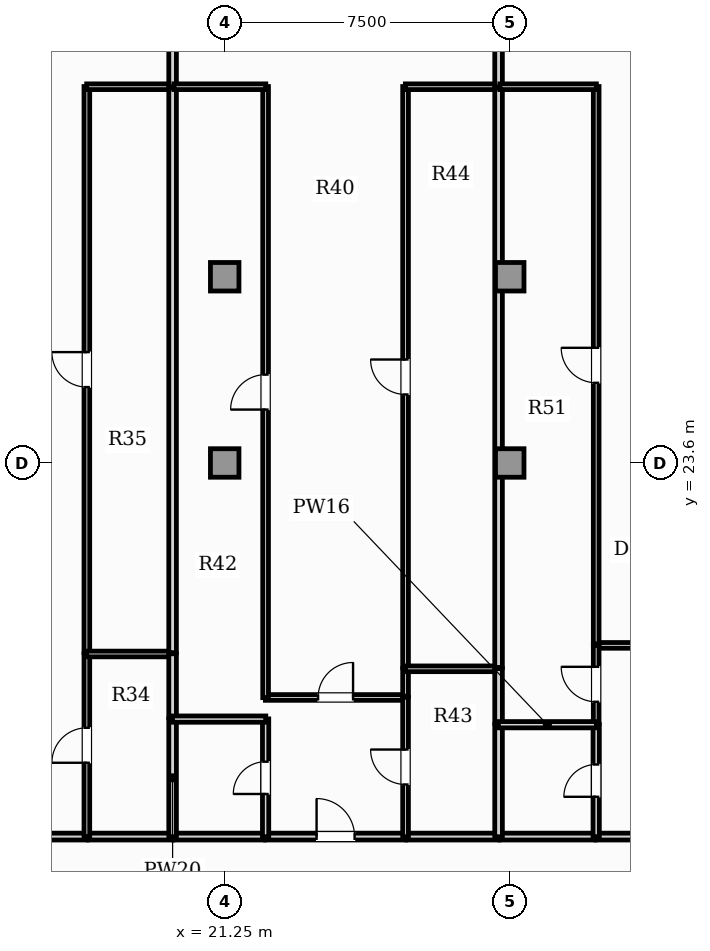
"""IFC4 building model, lengths in metres.
Left out: names, types, materials, properties, quantities, classifications, styles, units other than length and angle.
Written with IfcOpenShell. Run it as: python <this file> out.ifc"""

import sys

from ifc_helpers import new_model, si_unit, direction, frame, frame_2d, origin, origin_2d, place, context, subcontext, project, spatial, rectangle, extrude, element, fill, save


model = new_model("IFC4")
c1 = context("Model", 3, precision=1e-05, world=origin(), true_north=direction((0.0, 1.0)))
c2 = subcontext(c1, "Body", "Model", "MODEL_VIEW")
j1 = project(units=[si_unit("LENGTHUNIT", "METRE"), si_unit("PLANEANGLEUNIT", "RADIAN")], contexts=[c1])
p1 = place(None, origin())
s1 = spatial("IfcSite", under=j1, at=p1, CompositionType="ELEMENT")
p2 = place(p1, origin())
s2 = spatial("IfcBuilding", under=s1, at=p2, CompositionType="ELEMENT")
p3 = place(p2, frame((0.0, 0.0, 119.55)))
s3 = spatial("IfcBuildingStorey", under=s2, at=p3, CompositionType="ELEMENT", Elevation=119.55)
for number, where, z_axis, x_axis in (
    (1, (21.25, 23.6, 0.0), (0.0, 0.0, 1.0), (1.0, 0.0, 0.0)),
    (2, (28.75, 23.6, 0.0), (0.0, 0.0, 1.0), (1.0, 0.0, 0.0)),
    (3, (21.25, 28.5, 0.0), (0.0, 0.0, 1.0), (1.0, 0.0, 0.0)),
    (4, (28.75, 28.5, 0.0), (0.0, 0.0, 1.0), (1.0, 0.0, 0.0)),
):
    element("IfcColumn", number, at=place(p3, frame(where, z_axis=z_axis, x_axis=x_axis)), inside=s3, PredefinedType="COLUMN", context=c2, shape_type="SweptSolid", body=[
        extrude(rectangle(XDim=0.75, YDim=0.75, at=origin_2d()), origin(), (0.0, 0.0, 1.0), 3.85),
    ])
p4 = place(p3, frame((14.206, 13.77, 0.0), z_axis=(0.0, 0.0, 1.0), x_axis=(1.0, 0.0, 0.0)))
e5 = element("IfcWall", 5, at=p4, inside=s3, PredefinedType="PARTITIONING", context=c2, shape_type="SweptSolid", body=[
    extrude(rectangle(XDim=3.422, YDim=0.18, at=frame_2d((1.711, 0.0))), origin(), (0.0, 0.0, 1.0), 3.6),
])
p5 = place(p4, frame((1.211, 0.0, 0.0)))
e6 = element("IfcOpeningElement", 6, at=p5, cuts=e5, PredefinedType="OPENING", context=c2, shape_type="SweptSolid", body=[
    extrude(rectangle(XDim=1.0, YDim=2.15, at=frame_2d((0.5, 1.075))), frame((0.0, 0.1, 0.0), z_axis=(0.0, -1.0, 0.0), x_axis=(1.0, 0.0, 0.0)), (0.0, 0.0, 1.0), 0.2),
])
p6 = place(p3, frame((17.658, 13.77, 0.0), z_axis=(0.0, 0.0, 1.0), x_axis=(1.0, 0.0, 0.0)))
e7 = element("IfcWall", 7, at=p6, inside=s3, PredefinedType="PARTITIONING", context=c2, shape_type="SweptSolid", body=[
    extrude(rectangle(XDim=2.226, YDim=0.18, at=frame_2d((1.113, 0.0))), origin(), (0.0, 0.0, 1.0), 3.6),
])
p7 = place(p3, frame((22.321, 13.77, 0.0), z_axis=(0.0, 0.0, 1.0), x_axis=(1.0, 0.0, 0.0)))
e8 = element("IfcWall", 8, at=p7, inside=s3, PredefinedType="PARTITIONING", context=c2, shape_type="SweptSolid", body=[
    extrude(rectangle(XDim=3.693, YDim=0.18, at=frame_2d((1.846, 0.0))), origin(), (0.0, 0.0, 1.0), 3.6),
])
p8 = place(p7, frame((1.346, 0.0, 0.0)))
e9 = element("IfcOpeningElement", 9, at=p8, cuts=e8, PredefinedType="OPENING", context=c2, shape_type="SweptSolid", body=[
    extrude(rectangle(XDim=1.0, YDim=2.15, at=frame_2d((0.5, 1.075))), frame((0.0, 0.1, 0.0), z_axis=(0.0, -1.0, 0.0), x_axis=(1.0, 0.0, 0.0)), (0.0, 0.0, 1.0), 0.2),
])
p9 = place(p3, frame((19.914, 13.77, 0.0), z_axis=(0.0, 0.0, 1.0), x_axis=(1.0, 0.0, 0.0)))
e10 = element("IfcWall", 10, at=p9, inside=s3, PredefinedType="PARTITIONING", context=c2, shape_type="SweptSolid", body=[
    extrude(rectangle(XDim=2.377, YDim=0.18, at=frame_2d((1.188, 0.0))), origin(), (0.0, 0.0, 1.0), 3.6),
])
p10 = place(p3, frame((26.044, 13.77, 0.0), z_axis=(0.0, 0.0, 1.0), x_axis=(1.0, 0.0, 0.0)))
e11 = element("IfcWall", 11, at=p10, inside=s3, PredefinedType="PARTITIONING", context=c2, shape_type="SweptSolid", body=[
    extrude(rectangle(XDim=2.417, YDim=0.18, at=frame_2d((1.208, 0.0))), origin(), (0.0, 0.0, 1.0), 3.6),
])
p11 = place(p3, frame((31.02, 13.77, 0.0), z_axis=(0.0, 0.0, 1.0), x_axis=(1.0, 0.0, 0.0)))
e12 = element("IfcWall", 12, at=p11, inside=s3, PredefinedType="PARTITIONING", context=c2, shape_type="SweptSolid", body=[
    extrude(rectangle(XDim=3.963, YDim=0.18, at=frame_2d((1.981, 0.0))), origin(), (0.0, 0.0, 1.0), 3.6),
])
p12 = place(p11, frame((1.481, 0.0, 0.0)))
e13 = element("IfcOpeningElement", 13, at=p12, cuts=e12, PredefinedType="OPENING", context=c2, shape_type="SweptSolid", body=[
    extrude(rectangle(XDim=1.0, YDim=2.15, at=frame_2d((0.5, 1.075))), frame((0.0, 0.1, 0.0), z_axis=(0.0, -1.0, 0.0), x_axis=(1.0, 0.0, 0.0)), (0.0, 0.0, 1.0), 0.2),
])
p13 = place(p3, frame((28.491, 13.77, 0.0), z_axis=(0.0, 0.0, 1.0), x_axis=(1.0, 0.0, 0.0)))
e14 = element("IfcWall", 14, at=p13, inside=s3, PredefinedType="PARTITIONING", context=c2, shape_type="SweptSolid", body=[
    extrude(rectangle(XDim=2.498, YDim=0.18, at=frame_2d((1.249, 0.0))), origin(), (0.0, 0.0, 1.0), 3.6),
])
p14 = place(p3, frame((17.623, 13.765, 0.0), z_axis=(0.0, 0.0, 1.0), x_axis=(0.0, 1.0, 0.0)))
e15 = element("IfcWall", 15, at=p14, inside=s3, PredefinedType="PARTITIONING", context=c2, shape_type="SweptSolid", body=[
    extrude(rectangle(XDim=4.814, YDim=0.15, at=frame_2d((2.407, 0.0))), origin(), (0.0, 0.0, 1.0), 3.6),
])
p15 = place(p14, frame((1.947, 0.0, 0.0)))
e16 = element("IfcOpeningElement", 16, at=p15, cuts=e15, PredefinedType="OPENING", context=c2, shape_type="SweptSolid", body=[
    extrude(rectangle(XDim=0.92, YDim=2.1, at=frame_2d((0.46, 1.05))), frame((0.0, 0.085, 0.0), z_axis=(0.0, -1.0, 0.0), x_axis=(1.0, 0.0, 0.0)), (0.0, 0.0, 1.0), 0.17),
])
p16 = place(p3, frame((17.623, 18.609, 0.0), z_axis=(0.0, 0.0, 1.0), x_axis=(0.0, 1.0, 0.0)))
e17 = element("IfcWall", 17, at=p16, inside=s3, PredefinedType="PARTITIONING", context=c2, shape_type="SweptSolid", body=[
    extrude(rectangle(XDim=14.896, YDim=0.15, at=frame_2d((7.448, 0.0))), origin(), (0.0, 0.0, 1.0), 3.6),
])
p17 = place(p16, frame((6.988, 0.0, 0.0)))
e18 = element("IfcOpeningElement", 18, at=p17, cuts=e17, PredefinedType="OPENING", context=c2, shape_type="SweptSolid", body=[
    extrude(rectangle(XDim=0.92, YDim=2.1, at=frame_2d((0.46, 1.05))), frame((0.0, 0.085, 0.0), z_axis=(0.0, -1.0, 0.0), x_axis=(1.0, 0.0, 0.0)), (0.0, 0.0, 1.0), 0.17),
])
p18 = place(p3, frame((17.618, 33.5, 0.0), z_axis=(0.0, 0.0, 1.0), x_axis=(1.0, 0.0, 0.0)))
e19 = element("IfcWall", 19, at=p18, inside=s3, PredefinedType="PARTITIONING", context=c2, shape_type="SweptSolid", body=[
    extrude(rectangle(XDim=2.266, YDim=0.15, at=frame_2d((1.133, 0.0))), origin(), (0.0, 0.0, 1.0), 3.6),
])
p19 = place(p3, frame((19.879, 33.495, 0.0), z_axis=(0.0, 0.0, 1.0), x_axis=(0.0, 1.0, 0.0)))
e20 = element("IfcWall", 20, at=p19, inside=s3, PredefinedType="PARTITIONING", context=c2, shape_type="SweptSolid", body=[
    extrude(rectangle(XDim=1.51, YDim=0.2, at=frame_2d((0.755, 0.0))), origin(), (0.0, 0.0, 1.0), 3.6),
])
p20 = place(p3, frame((17.618, 18.574, 0.0), z_axis=(0.0, 0.0, 1.0), x_axis=(1.0, 0.0, 0.0)))
e21 = element("IfcWall", 21, at=p20, inside=s3, PredefinedType="PARTITIONING", context=c2, shape_type="SweptSolid", body=[
    extrude(rectangle(XDim=2.266, YDim=0.15, at=frame_2d((1.133, 0.0))), origin(), (0.0, 0.0, 1.0), 3.6),
])
p21 = place(p3, frame((19.879, 13.765, 0.0), z_axis=(0.0, 0.0, 1.0), x_axis=(0.0, 1.0, 0.0)))
e22 = element("IfcWall", 22, at=p21, inside=s3, PredefinedType="PARTITIONING", context=c2, shape_type="SweptSolid", body=[
    extrude(rectangle(XDim=3.101, YDim=0.2, at=frame_2d((1.551, 0.0))), origin(), (0.0, 0.0, 1.0), 3.6),
])
p22 = place(p3, frame((19.879, 16.896, 0.0), z_axis=(0.0, 0.0, 1.0), x_axis=(0.0, 1.0, 0.0)))
e23 = element("IfcWall", 23, at=p22, inside=s3, PredefinedType="PARTITIONING", context=c2, shape_type="SweptSolid", body=[
    extrude(rectangle(XDim=1.683, YDim=0.2, at=frame_2d((0.842, 0.0))), origin(), (0.0, 0.0, 1.0), 3.6),
])
p23 = place(p3, frame((19.879, 18.609, 0.0), z_axis=(0.0, 0.0, 1.0), x_axis=(0.0, 1.0, 0.0)))
e24 = element("IfcWall", 24, at=p23, inside=s3, PredefinedType="PARTITIONING", context=c2, shape_type="SweptSolid", body=[
    extrude(rectangle(XDim=14.856, YDim=0.2, at=frame_2d((7.428, 0.0))), origin(), (0.0, 0.0, 1.0), 3.6),
])
p24 = place(p3, frame((22.321, 17.43, 0.0), z_axis=(0.0, 0.0, 1.0), x_axis=(1.0, 0.0, 0.0)))
e25 = element("IfcWall", 25, at=p24, inside=s3, PredefinedType="PARTITIONING", context=c2, shape_type="SweptSolid", body=[
    extrude(rectangle(XDim=3.693, YDim=0.15, at=frame_2d((1.846, 0.0))), origin(), (0.0, 0.0, 1.0), 3.6),
])
p25 = place(p24, frame((1.386, 0.0, 0.0)))
e26 = element("IfcOpeningElement", 26, at=p25, cuts=e25, PredefinedType="OPENING", context=c2, shape_type="SweptSolid", body=[
    extrude(rectangle(XDim=0.92, YDim=2.1, at=frame_2d((0.46, 1.05))), frame((0.0, 0.085, 0.0), z_axis=(0.0, -1.0, 0.0), x_axis=(1.0, 0.0, 0.0)), (0.0, 0.0, 1.0), 0.17),
])
p26 = place(p3, frame((22.326, 13.765, 0.0), z_axis=(0.0, 0.0, 1.0), x_axis=(0.0, 1.0, 0.0)))
e27 = element("IfcWall", 27, at=p26, inside=s3, PredefinedType="PLUMBINGWALL", context=c2, shape_type="SweptSolid", body=[
    extrude(rectangle(XDim=3.101, YDim=0.165, at=frame_2d((1.551, 0.0))), origin(), (0.0, 0.0, 1.0), 3.6),
])
p27 = place(p26, frame((1.125, 0.0, 0.0)))
e28 = element("IfcOpeningElement", 28, at=p27, cuts=e27, PredefinedType="OPENING", context=c2, shape_type="SweptSolid", body=[
    extrude(rectangle(XDim=0.85, YDim=2.1, at=frame_2d((0.425, 1.05))), frame((0.0, 0.093, 0.0), z_axis=(0.0, -1.0, 0.0), x_axis=(1.0, 0.0, 0.0)), (0.0, 0.0, 1.0), 0.185),
])
p28 = place(p3, frame((26.009, 13.765, 0.0), z_axis=(0.0, 0.0, 1.0), x_axis=(0.0, 1.0, 0.0)))
e29 = element("IfcWall", 29, at=p28, inside=s3, PredefinedType="PARTITIONING", context=c2, shape_type="SweptSolid", body=[
    extrude(rectangle(XDim=3.67, YDim=0.15, at=frame_2d((1.835, 0.0))), origin(), (0.0, 0.0, 1.0), 3.6),
])
p29 = place(p28, frame((1.375, 0.0, 0.0)))
e30 = element("IfcOpeningElement", 30, at=p29, cuts=e29, PredefinedType="OPENING", context=c2, shape_type="SweptSolid", body=[
    extrude(rectangle(XDim=0.92, YDim=2.1, at=frame_2d((0.46, 1.05))), frame((0.0, 0.085, 0.0), z_axis=(0.0, -1.0, 0.0), x_axis=(1.0, 0.0, 0.0)), (0.0, 0.0, 1.0), 0.17),
])
p30 = place(p3, frame((22.326, 17.425, 0.0), z_axis=(0.0, 0.0, 1.0), x_axis=(0.0, 1.0, 0.0)))
e31 = element("IfcWall", 31, at=p30, inside=s3, PredefinedType="PARTITIONING", context=c2, shape_type="SweptSolid", body=[
    extrude(rectangle(XDim=16.08, YDim=0.15, at=frame_2d((8.04, 0.0))), origin(), (0.0, 0.0, 1.0), 3.6),
])
p31 = place(p30, frame((7.58, 0.0, 0.0)))
e32 = element("IfcOpeningElement", 32, at=p31, cuts=e31, PredefinedType="OPENING", context=c2, shape_type="SweptSolid", body=[
    extrude(rectangle(XDim=0.92, YDim=2.1, at=frame_2d((0.46, 1.05))), frame((0.0, 0.085, 0.0), z_axis=(0.0, -1.0, 0.0), x_axis=(1.0, 0.0, 0.0)), (0.0, 0.0, 1.0), 0.17),
])
p32 = place(p3, frame((19.914, 33.5, 0.0), z_axis=(0.0, 0.0, 1.0), x_axis=(1.0, 0.0, 0.0)))
e33 = element("IfcWall", 33, at=p32, inside=s3, PredefinedType="PARTITIONING", context=c2, shape_type="SweptSolid", body=[
    extrude(rectangle(XDim=2.417, YDim=0.15, at=frame_2d((1.208, 0.0))), origin(), (0.0, 0.0, 1.0), 3.6),
])
p33 = place(p3, frame((26.009, 17.465, 0.0), z_axis=(0.0, 0.0, 1.0), x_axis=(0.0, 1.0, 0.0)))
e34 = element("IfcWall", 34, at=p33, inside=s3, PredefinedType="PARTITIONING", context=c2, shape_type="SweptSolid", body=[
    extrude(rectangle(XDim=0.724, YDim=0.15, at=frame_2d((0.362, 0.0))), origin(), (0.0, 0.0, 1.0), 3.6),
])
p34 = place(p3, frame((26.009, 18.219, 0.0), z_axis=(0.0, 0.0, 1.0), x_axis=(0.0, 1.0, 0.0)))
e35 = element("IfcWall", 35, at=p34, inside=s3, PredefinedType="PARTITIONING", context=c2, shape_type="SweptSolid", body=[
    extrude(rectangle(XDim=15.285, YDim=0.15, at=frame_2d((7.643, 0.0))), origin(), (0.0, 0.0, 1.0), 3.6),
])
p35 = place(p34, frame((7.183, 0.0, 0.0)))
e36 = element("IfcOpeningElement", 36, at=p35, cuts=e35, PredefinedType="OPENING", context=c2, shape_type="SweptSolid", body=[
    extrude(rectangle(XDim=0.92, YDim=2.1, at=frame_2d((0.46, 1.05))), frame((0.0, 0.085, 0.0), z_axis=(0.0, -1.0, 0.0), x_axis=(1.0, 0.0, 0.0)), (0.0, 0.0, 1.0), 0.17),
])
p36 = place(p3, frame((26.004, 33.5, 0.0), z_axis=(0.0, 0.0, 1.0), x_axis=(1.0, 0.0, 0.0)))
e37 = element("IfcWall", 37, at=p36, inside=s3, PredefinedType="PARTITIONING", context=c2, shape_type="SweptSolid", body=[
    extrude(rectangle(XDim=2.457, YDim=0.15, at=frame_2d((1.229, 0.0))), origin(), (0.0, 0.0, 1.0), 3.6),
])
p37 = place(p3, frame((28.456, 33.495, 0.0), z_axis=(0.0, 0.0, 1.0), x_axis=(0.0, 1.0, 0.0)))
e38 = element("IfcWall", 38, at=p37, inside=s3, PredefinedType="PARTITIONING", context=c2, shape_type="SweptSolid", body=[
    extrude(rectangle(XDim=1.51, YDim=0.2, at=frame_2d((0.755, 0.0))), origin(), (0.0, 0.0, 1.0), 3.6),
])
p38 = place(p3, frame((19.874, 16.861, 0.0), z_axis=(0.0, 0.0, 1.0), x_axis=(1.0, 0.0, 0.0)))
e39 = element("IfcWall", 39, at=p38, inside=s3, PredefinedType="PLUMBINGWALL", context=c2, shape_type="SweptSolid", body=[
    extrude(rectangle(XDim=2.457, YDim=0.165, at=frame_2d((1.229, 0.0))), origin(), (0.0, 0.0, 1.0), 3.6),
])
p39 = place(p3, frame((26.004, 18.185, 0.0), z_axis=(0.0, 0.0, 1.0), x_axis=(1.0, 0.0, 0.0)))
e40 = element("IfcWall", 40, at=p39, inside=s3, PredefinedType="PARTITIONING", context=c2, shape_type="SweptSolid", body=[
    extrude(rectangle(XDim=2.457, YDim=0.15, at=frame_2d((1.229, 0.0))), origin(), (0.0, 0.0, 1.0), 3.6),
])
p40 = place(p3, frame((28.456, 13.765, 0.0), z_axis=(0.0, 0.0, 1.0), x_axis=(0.0, 1.0, 0.0)))
e41 = element("IfcWall", 41, at=p40, inside=s3, PredefinedType="PARTITIONING", context=c2, shape_type="SweptSolid", body=[
    extrude(rectangle(XDim=2.953, YDim=0.2, at=frame_2d((1.477, 0.0))), origin(), (0.0, 0.0, 1.0), 3.6),
])
p41 = place(p3, frame((28.456, 16.748, 0.0), z_axis=(0.0, 0.0, 1.0), x_axis=(0.0, 1.0, 0.0)))
e42 = element("IfcWall", 42, at=p41, inside=s3, PredefinedType="PARTITIONING", context=c2, shape_type="SweptSolid", body=[
    extrude(rectangle(XDim=1.441, YDim=0.2, at=frame_2d((0.721, 0.0))), origin(), (0.0, 0.0, 1.0), 3.6),
])
p42 = place(p3, frame((28.456, 18.219, 0.0), z_axis=(0.0, 0.0, 1.0), x_axis=(0.0, 1.0, 0.0)))
e43 = element("IfcWall", 43, at=p42, inside=s3, PredefinedType="PARTITIONING", context=c2, shape_type="SweptSolid", body=[
    extrude(rectangle(XDim=15.246, YDim=0.2, at=frame_2d((7.623, 0.0))), origin(), (0.0, 0.0, 1.0), 3.6),
])
p43 = place(p3, frame((31.02, 18.801, 0.0), z_axis=(0.0, 0.0, 1.0), x_axis=(1.0, 0.0, 0.0)))
e44 = element("IfcWall", 44, at=p43, inside=s3, PredefinedType="PARTITIONING", context=c2, shape_type="SweptSolid", body=[
    extrude(rectangle(XDim=3.963, YDim=0.15, at=frame_2d((1.981, 0.0))), origin(), (0.0, 0.0, 1.0), 3.6),
])
p44 = place(p43, frame((1.521, 0.0, 0.0)))
e45 = element("IfcOpeningElement", 45, at=p44, cuts=e44, PredefinedType="OPENING", context=c2, shape_type="SweptSolid", body=[
    extrude(rectangle(XDim=0.92, YDim=2.1, at=frame_2d((0.46, 1.05))), frame((0.0, 0.085, 0.0), z_axis=(0.0, -1.0, 0.0), x_axis=(1.0, 0.0, 0.0)), (0.0, 0.0, 1.0), 0.17),
])
p45 = place(p3, frame((31.025, 13.765, 0.0), z_axis=(0.0, 0.0, 1.0), x_axis=(0.0, 1.0, 0.0)))
e46 = element("IfcWall", 46, at=p45, inside=s3, PredefinedType="PLUMBINGWALL", context=c2, shape_type="SweptSolid", body=[
    extrude(rectangle(XDim=2.953, YDim=0.165, at=frame_2d((1.477, 0.0))), origin(), (0.0, 0.0, 1.0), 3.6),
])
p46 = place(p45, frame((1.052, 0.0, 0.0)))
e47 = element("IfcOpeningElement", 47, at=p46, cuts=e46, PredefinedType="OPENING", context=c2, shape_type="SweptSolid", body=[
    extrude(rectangle(XDim=0.85, YDim=2.1, at=frame_2d((0.425, 1.05))), frame((0.0, 0.093, 0.0), z_axis=(0.0, -1.0, 0.0), x_axis=(1.0, 0.0, 0.0)), (0.0, 0.0, 1.0), 0.185),
])
p47 = place(p3, frame((31.025, 16.748, 0.0), z_axis=(0.0, 0.0, 1.0), x_axis=(0.0, 1.0, 0.0)))
e48 = element("IfcWall", 48, at=p47, inside=s3, PredefinedType="PARTITIONING", context=c2, shape_type="SweptSolid", body=[
    extrude(rectangle(XDim=2.057, YDim=0.15, at=frame_2d((1.029, 0.0))), origin(), (0.0, 0.0, 1.0), 3.6),
])
p48 = place(p47, frame((0.569, 0.0, 0.0)))
e49 = element("IfcOpeningElement", 49, at=p48, cuts=e48, PredefinedType="OPENING", context=c2, shape_type="SweptSolid", body=[
    extrude(rectangle(XDim=0.92, YDim=2.1, at=frame_2d((0.46, 1.05))), frame((0.0, 0.085, 0.0), z_axis=(0.0, -1.0, 0.0), x_axis=(1.0, 0.0, 0.0)), (0.0, 0.0, 1.0), 0.17),
])
p49 = place(p3, frame((31.025, 18.835, 0.0), z_axis=(0.0, 0.0, 1.0), x_axis=(0.0, 1.0, 0.0)))
e50 = element("IfcWall", 50, at=p49, inside=s3, PredefinedType="PARTITIONING", context=c2, shape_type="SweptSolid", body=[
    extrude(rectangle(XDim=14.669, YDim=0.15, at=frame_2d((7.335, 0.0))), origin(), (0.0, 0.0, 1.0), 3.6),
])
p50 = place(p49, frame((6.875, 0.0, 0.0)))
e51 = element("IfcOpeningElement", 51, at=p50, cuts=e50, PredefinedType="OPENING", context=c2, shape_type="SweptSolid", body=[
    extrude(rectangle(XDim=0.92, YDim=2.1, at=frame_2d((0.46, 1.05))), frame((0.0, 0.085, 0.0), z_axis=(0.0, -1.0, 0.0), x_axis=(1.0, 0.0, 0.0)), (0.0, 0.0, 1.0), 0.17),
])
p51 = place(p3, frame((28.491, 33.5, 0.0), z_axis=(0.0, 0.0, 1.0), x_axis=(1.0, 0.0, 0.0)))
e52 = element("IfcWall", 52, at=p51, inside=s3, PredefinedType="PARTITIONING", context=c2, shape_type="SweptSolid", body=[
    extrude(rectangle(XDim=2.538, YDim=0.15, at=frame_2d((1.269, 0.0))), origin(), (0.0, 0.0, 1.0), 3.6),
])
p52 = place(p3, frame((28.451, 16.713, 0.0), z_axis=(0.0, 0.0, 1.0), x_axis=(1.0, 0.0, 0.0)))
e53 = element("IfcWall", 53, at=p52, inside=s3, PredefinedType="PLUMBINGWALL", context=c2, shape_type="SweptSolid", body=[
    extrude(rectangle(XDim=2.578, YDim=0.165, at=frame_2d((1.289, 0.0))), origin(), (0.0, 0.0, 1.0), 3.6),
])
p53 = place(p8, origin())
e54 = element("IfcDoor", 54, at=p53, inside=s3, OperationType="SINGLE_SWING_LEFT", PredefinedType="DOOR", context=c2, shape_type="SweptSolid", body=[
    extrude(rectangle(XDim=1.0, YDim=2.15, at=frame_2d((0.5, 1.075))), frame((0.0, 0.025, 0.0), z_axis=(0.0, -1.0, 0.0), x_axis=(1.0, 0.0, 0.0)), (0.0, 0.0, 1.0), 0.05),
])
fill(e9, e54)
p54 = place(p15, origin())
e55 = element("IfcDoor", 55, at=p54, inside=s3, OperationType="SINGLE_SWING_LEFT", PredefinedType="DOOR", context=c2, shape_type="SweptSolid", body=[
    extrude(rectangle(XDim=0.92, YDim=2.1, at=frame_2d((0.46, 1.05))), frame((0.0, 0.025, 0.0), z_axis=(0.0, -1.0, 0.0), x_axis=(1.0, 0.0, 0.0)), (0.0, 0.0, 1.0), 0.05),
])
fill(e16, e55)
p55 = place(p17, origin())
e56 = element("IfcDoor", 56, at=p55, inside=s3, OperationType="SINGLE_SWING_RIGHT", PredefinedType="DOOR", context=c2, shape_type="SweptSolid", body=[
    extrude(rectangle(XDim=0.92, YDim=2.1, at=frame_2d((0.46, 1.05))), frame((0.0, 0.025, 0.0), z_axis=(0.0, -1.0, 0.0), x_axis=(1.0, 0.0, 0.0)), (0.0, 0.0, 1.0), 0.05),
])
fill(e18, e56)
p56 = place(p25, origin())
e57 = element("IfcDoor", 57, at=p56, inside=s3, OperationType="SINGLE_SWING_RIGHT", PredefinedType="DOOR", context=c2, shape_type="SweptSolid", body=[
    extrude(rectangle(XDim=0.92, YDim=2.1, at=frame_2d((0.46, 1.05))), frame((0.0, 0.025, 0.0), z_axis=(0.0, -1.0, 0.0), x_axis=(1.0, 0.0, 0.0)), (0.0, 0.0, 1.0), 0.05),
])
fill(e26, e57)
p57 = place(p27, origin())
e58 = element("IfcDoor", 58, at=p57, inside=s3, OperationType="SINGLE_SWING_LEFT", PredefinedType="DOOR", context=c2, shape_type="SweptSolid", body=[
    extrude(rectangle(XDim=0.85, YDim=2.1, at=frame_2d((0.425, 1.05))), frame((0.0, 0.025, 0.0), z_axis=(0.0, -1.0, 0.0), x_axis=(1.0, 0.0, 0.0)), (0.0, 0.0, 1.0), 0.05),
])
fill(e28, e58)
p58 = place(p29, origin())
e59 = element("IfcDoor", 59, at=p58, inside=s3, OperationType="SINGLE_SWING_RIGHT", PredefinedType="DOOR", context=c2, shape_type="SweptSolid", body=[
    extrude(rectangle(XDim=0.92, YDim=2.1, at=frame_2d((0.46, 1.05))), frame((0.0, 0.025, 0.0), z_axis=(0.0, -1.0, 0.0), x_axis=(1.0, 0.0, 0.0)), (0.0, 0.0, 1.0), 0.05),
])
fill(e30, e59)
p59 = place(p31, origin())
e60 = element("IfcDoor", 60, at=p59, inside=s3, OperationType="SINGLE_SWING_LEFT", PredefinedType="DOOR", context=c2, shape_type="SweptSolid", body=[
    extrude(rectangle(XDim=0.92, YDim=2.1, at=frame_2d((0.46, 1.05))), frame((0.0, 0.025, 0.0), z_axis=(0.0, -1.0, 0.0), x_axis=(1.0, 0.0, 0.0)), (0.0, 0.0, 1.0), 0.05),
])
fill(e32, e60)
p60 = place(p35, origin())
e61 = element("IfcDoor", 61, at=p60, inside=s3, OperationType="SINGLE_SWING_RIGHT", PredefinedType="DOOR", context=c2, shape_type="SweptSolid", body=[
    extrude(rectangle(XDim=0.92, YDim=2.1, at=frame_2d((0.46, 1.05))), frame((0.0, 0.025, 0.0), z_axis=(0.0, -1.0, 0.0), x_axis=(1.0, 0.0, 0.0)), (0.0, 0.0, 1.0), 0.05),
])
fill(e36, e61)
p61 = place(p46, origin())
e62 = element("IfcDoor", 62, at=p61, inside=s3, OperationType="SINGLE_SWING_LEFT", PredefinedType="DOOR", context=c2, shape_type="SweptSolid", body=[
    extrude(rectangle(XDim=0.85, YDim=2.1, at=frame_2d((0.425, 1.05))), frame((0.0, 0.025, 0.0), z_axis=(0.0, -1.0, 0.0), x_axis=(1.0, 0.0, 0.0)), (0.0, 0.0, 1.0), 0.05),
])
fill(e47, e62)
p62 = place(p48, origin())
e63 = element("IfcDoor", 63, at=p62, inside=s3, OperationType="SINGLE_SWING_RIGHT", PredefinedType="DOOR", context=c2, shape_type="SweptSolid", body=[
    extrude(rectangle(XDim=0.92, YDim=2.1, at=frame_2d((0.46, 1.05))), frame((0.0, 0.025, 0.0), z_axis=(0.0, -1.0, 0.0), x_axis=(1.0, 0.0, 0.0)), (0.0, 0.0, 1.0), 0.05),
])
fill(e49, e63)
p63 = place(p50, origin())
e64 = element("IfcDoor", 64, at=p63, inside=s3, OperationType="SINGLE_SWING_RIGHT", PredefinedType="DOOR", context=c2, shape_type="SweptSolid", body=[
    extrude(rectangle(XDim=0.92, YDim=2.1, at=frame_2d((0.46, 1.05))), frame((0.0, 0.025, 0.0), z_axis=(0.0, -1.0, 0.0), x_axis=(1.0, 0.0, 0.0)), (0.0, 0.0, 1.0), 0.05),
])
fill(e51, e64)
save(model, sys.argv[1])
